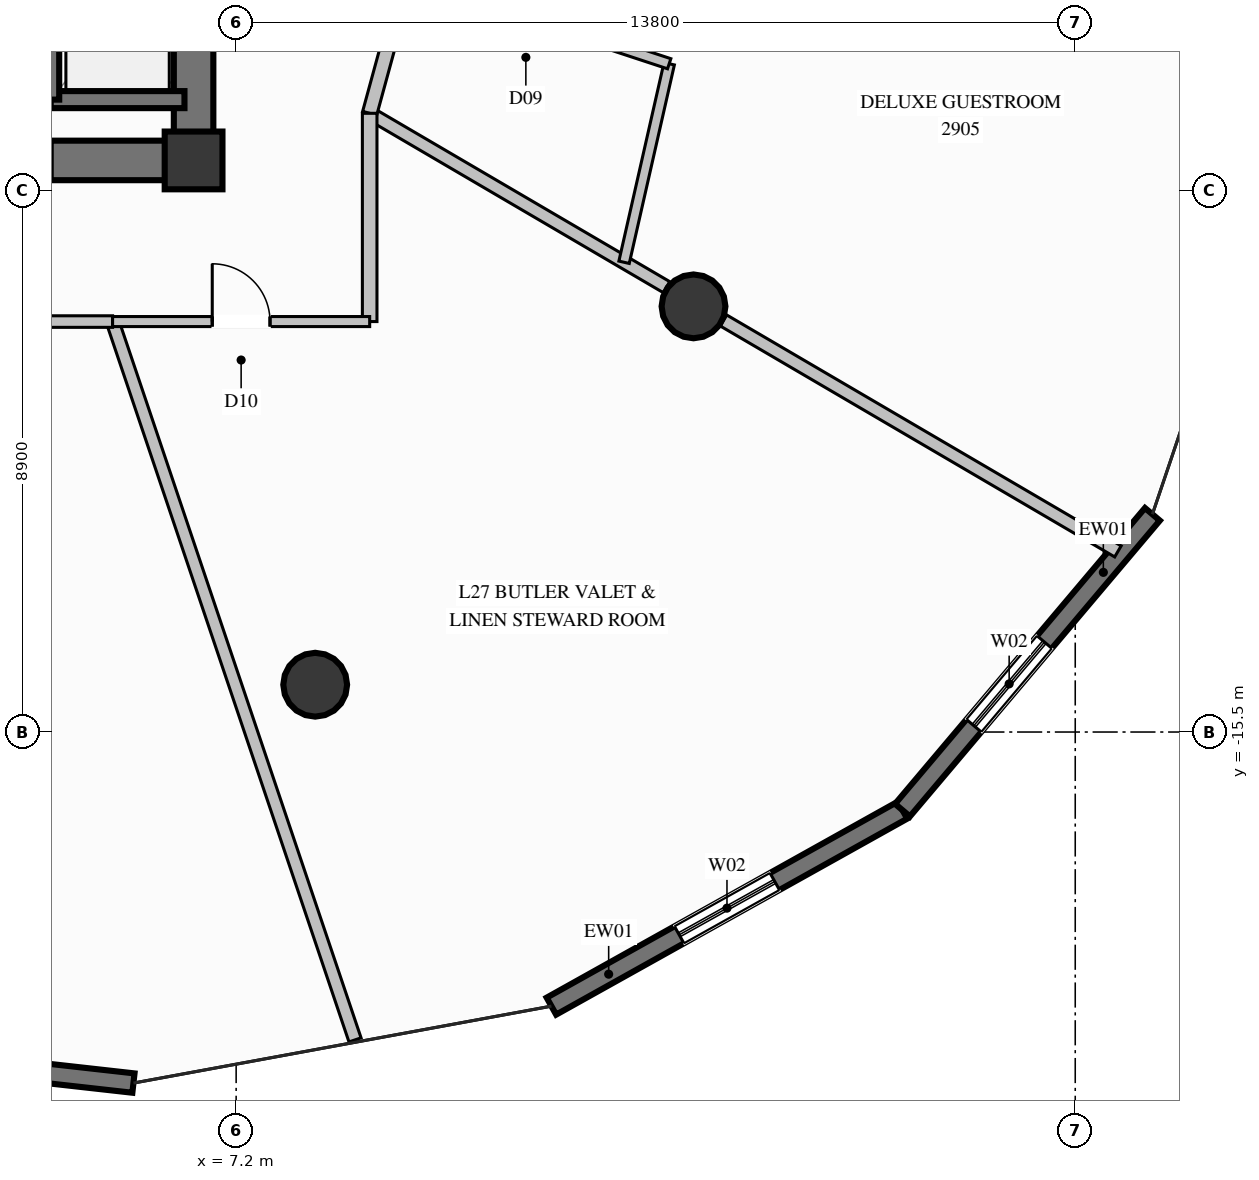
"""IFC4 building model, lengths in metres.
Left out: names, types, materials, properties, quantities, classifications, styles, units other than length and angle.
Written with IfcOpenShell. Run it as: python <this file> out.ifc"""

import sys

from ifc_helpers import new_model, si_unit, direction, frame, frame_2d, origin, origin_2d, place, context, subcontext, project, spatial, rectangle, circle, extrude, element, fill, save


model = new_model("IFC4")
c1 = context("Model", 3, precision=1e-05, world=origin(), true_north=direction((0.0, 1.0)))
c2 = subcontext(c1, "Body", "Model", "MODEL_VIEW")
j1 = project(units=[si_unit("LENGTHUNIT", "METRE"), si_unit("PLANEANGLEUNIT", "RADIAN")], contexts=[c1])
p1 = place(None, origin())
s1 = spatial("IfcSite", under=j1, at=p1, CompositionType="ELEMENT")
p2 = place(p1, origin())
s2 = spatial("IfcBuilding", under=s1, at=p2, CompositionType="ELEMENT")
p3 = place(p2, frame((0.0, 0.0, 109.8)))
s3 = spatial("IfcBuildingStorey", under=s2, at=p3, CompositionType="ELEMENT", Elevation=109.8)
p4 = place(p3, frame((6.5, -6.1, 0.0), z_axis=(0.0, 0.0, 1.0), x_axis=(1.0, 0.0, 0.0)))
e1 = element("IfcColumn", 1, at=p4, inside=s3, PredefinedType="COLUMN", context=c2, shape_type="SweptSolid", body=[
    extrude(rectangle(XDim=0.95, YDim=0.95, at=origin_2d()), origin(), (0.0, 0.0, 1.0), 3.6),
])
p5 = place(p3, frame((4.15, -6.1, 0.0), z_axis=(0.0, 0.0, 1.0), x_axis=(1.0, 0.0, 0.0)))
e2 = element("IfcWall", 2, at=p5, inside=s3, PredefinedType="SHEAR", context=c2, shape_type="SweptSolid", body=[
    extrude(rectangle(XDim=2.025, YDim=0.65, at=frame_2d((1.013, 0.0))), origin(), (0.0, 0.0, 1.0), 3.6),
])
p6 = place(p3, frame((6.5, -6.425, 0.0), z_axis=(0.0, 0.0, 1.0), x_axis=(0.0, 1.0, 0.0)))
e3 = element("IfcWall", 3, at=p6, inside=s3, PredefinedType="SHEAR", context=c2, shape_type="SweptSolid", body=[
    extrude(rectangle(XDim=4.075, YDim=0.65, at=frame_2d((2.038, 0.0))), origin(), (0.0, 0.0, 1.0), 3.6),
])
for number, where, z_axis, x_axis in (
    (4, (8.5, -14.722, 0.0), (0.0, 0.0, 1.0), (1.0, 0.0, 0.0)),
    (5, (14.722, -8.5, 0.0), (0.0, 0.0, 1.0), (1.0, 0.0, 0.0)),
):
    element("IfcColumn", number, at=place(p3, frame(where, z_axis=z_axis, x_axis=x_axis)), inside=s3, PredefinedType="COLUMN", context=c2, shape_type="SweptSolid", body=[
        extrude(circle(Radius=0.525, at=origin_2d()), origin(), (0.0, 0.0, 1.0), 3.6),
    ])
p7 = place(p3, frame((5.511, -21.273, 0.0), z_axis=(0.0, 0.0, 1.0), x_axis=(-0.993784044115, 0.111325081016, 0.0)))
e6 = element("IfcWall", 6, at=p7, inside=s3, PredefinedType="SOLIDWALL", context=c2, shape_type="SweptSolid", body=[
    extrude(rectangle(XDim=7.347, YDim=0.32, at=frame_2d((3.673, 0.0))), origin(), (0.0, 0.0, 1.0), 3.35),
])
p8 = place(p7, frame((2.773, 0.0, 0.35)))
e7 = element("IfcOpeningElement", 7, at=p8, cuts=e6, PredefinedType="OPENING", context=c2, shape_type="SweptSolid", body=[
    extrude(rectangle(XDim=1.8, YDim=2.6, at=frame_2d((0.9, 1.3))), frame((0.0, 0.17, 0.0), z_axis=(0.0, -1.0, 0.0), x_axis=(1.0, 0.0, 0.0)), (0.0, 0.0, 1.0), 0.34),
])
p9 = place(p3, frame((18.159, -16.785, 0.0), z_axis=(0.0, 0.0, 1.0), x_axis=(-0.873166276034, -0.487422459882, 0.0)))
e8 = element("IfcWall", 8, at=p9, inside=s3, PredefinedType="SOLIDWALL", context=c2, shape_type="SweptSolid", body=[
    extrude(rectangle(XDim=6.613, YDim=0.32, at=frame_2d((3.306, 0.0))), origin(), (0.0, 0.0, 1.0), 3.35),
])
p10 = place(p9, frame((2.406, 0.0, 0.35)))
e9 = element("IfcOpeningElement", 9, at=p10, cuts=e8, PredefinedType="OPENING", context=c2, shape_type="SweptSolid", body=[
    extrude(rectangle(XDim=1.8, YDim=2.6, at=frame_2d((0.9, 1.3))), frame((0.0, 0.17, 0.0), z_axis=(0.0, -1.0, 0.0), x_axis=(1.0, 0.0, 0.0)), (0.0, 0.0, 1.0), 0.34),
])
p11 = place(p3, frame((22.269, -11.919, 0.0), z_axis=(0.0, 0.0, 1.0), x_axis=(-0.645278763483, -0.763947195425, 0.0)))
e10 = element("IfcWall", 10, at=p11, inside=s3, PredefinedType="SOLIDWALL", context=c2, shape_type="SweptSolid", body=[
    extrude(rectangle(XDim=6.369, YDim=0.32, at=frame_2d((3.185, 0.0))), origin(), (0.0, 0.0, 1.0), 3.35),
])
p12 = place(p11, frame((2.751, 0.0, 0.35)))
e11 = element("IfcOpeningElement", 11, at=p12, cuts=e10, PredefinedType="OPENING", context=c2, shape_type="SweptSolid", body=[
    extrude(rectangle(XDim=1.8, YDim=2.6, at=frame_2d((0.9, 1.3))), frame((0.0, 0.17, 0.0), z_axis=(0.0, -1.0, 0.0), x_axis=(1.0, 0.0, 0.0)), (0.0, 0.0, 1.0), 0.34),
])
p13 = place(p3, frame((4.15, -5.1, 0.0), z_axis=(0.0, 0.0, 1.0), x_axis=(1.0, 0.0, 0.0)))
e12 = element("IfcWall", 12, at=p13, inside=s3, PredefinedType="SOLIDWALL", context=c2, shape_type="SweptSolid", body=[
    extrude(rectangle(XDim=2.2, YDim=0.28, at=frame_2d((1.1, 0.0))), origin(), (0.0, 0.0, 1.0), 3.35),
])
p14 = place(p3, frame((4.15, -2.4, 0.0), z_axis=(0.0, 0.0, 1.0), x_axis=(0.0, -1.0, 0.0)))
e13 = element("IfcWall", 13, at=p14, inside=s3, PredefinedType="SOLIDWALL", context=c2, shape_type="SweptSolid", body=[
    extrude(rectangle(XDim=2.7, YDim=0.28, at=frame_2d((1.35, 0.0))), origin(), (0.0, 0.0, 1.0), 3.35),
])
p15 = place(p3, frame((9.396, -5.325, 0.0), z_axis=(0.0, 0.0, 1.0), x_axis=(0.862912125579, -0.505353998232, 0.0)))
e14 = element("IfcWall", 14, at=p15, inside=s3, PredefinedType="PARTITIONING", context=c2, shape_type="SweptSolid", body=[
    extrude(rectangle(XDim=5.658, YDim=0.21, at=frame_2d((2.829, 0.0))), origin(), (0.0, 0.0, 1.0), 2.791),
])
p16 = place(p3, frame((15.215, -8.732, 0.0), z_axis=(0.0, 0.0, 1.0), x_axis=(0.862960241997, -0.505271828556, 0.0)))
e15 = element("IfcWall", 15, at=p16, inside=s3, PredefinedType="PARTITIONING", context=c2, shape_type="SweptSolid", body=[
    extrude(rectangle(XDim=7.517, YDim=0.21, at=frame_2d((3.758, 0.0))), origin(), (0.0, 0.0, 1.0), 3.35),
])
p17 = place(p3, frame((9.396, -5.325, 0.0), z_axis=(0.0, 0.0, 1.0), x_axis=(0.263643210908, 0.964620265878, 0.0)))
e16 = element("IfcWall", 16, at=p17, inside=s3, PredefinedType="PARTITIONING", context=c2, shape_type="SweptSolid", body=[
    extrude(rectangle(XDim=2.318, YDim=0.24, at=frame_2d((1.159, 0.0))), origin(), (0.0, 0.0, 1.0), 3.35),
])
p18 = place(p3, frame((13.58, -7.775, 0.0), z_axis=(0.0, 0.0, 1.0), x_axis=(0.221599041774, 0.975137869578, 0.0)))
e17 = element("IfcWall", 17, at=p18, inside=s3, PredefinedType="PLUMBINGWALL", context=c2, shape_type="SweptSolid", body=[
    extrude(rectangle(XDim=3.348, YDim=0.175, at=frame_2d((1.674, 0.0))), origin(), (0.0, 0.0, 1.0), 3.35),
])
p19 = place(p3, frame((10.007, -3.089, 0.0), z_axis=(0.0, 0.0, 1.0), x_axis=(0.949827092004, -0.312775471057, 0.0)))
e18 = element("IfcWall", 18, at=p19, inside=s3, PredefinedType="PLUMBINGWALL", context=c2, shape_type="SweptSolid", body=[
    extrude(rectangle(XDim=4.543, YDim=0.175, at=frame_2d((2.271, 0.0))), origin(), (0.0, 0.0, 1.0), 3.35),
])
p20 = place(p19, frame((1.821, 0.0, 0.0)))
e19 = element("IfcOpeningElement", 19, at=p20, cuts=e18, PredefinedType="OPENING", context=c2, shape_type="SweptSolid", body=[
    extrude(rectangle(XDim=0.9, YDim=2.1, at=frame_2d((0.45, 1.05))), frame((0.0, 0.098, 0.0), z_axis=(0.0, -1.0, 0.0), x_axis=(1.0, 0.0, 0.0)), (0.0, 0.0, 1.0), 0.195),
])
p21 = place(p3, frame((5.168, -8.75, 0.0), z_axis=(0.0, 0.0, 1.0), x_axis=(0.319791389232, -0.947487977429, 0.0)))
e20 = element("IfcWall", 20, at=p21, inside=s3, PredefinedType="PARTITIONING", context=c2, shape_type="SweptSolid", body=[
    extrude(rectangle(XDim=12.468, YDim=0.21, at=frame_2d((6.234, 0.0))), origin(), (0.0, 0.0, 1.0), 3.35),
])
p22 = place(p3, frame((0.0, -8.75, 0.0), z_axis=(0.0, 0.0, 1.0), x_axis=(1.0, 0.0, 0.0)))
e21 = element("IfcWall", 21, at=p22, inside=s3, PredefinedType="PARTITIONING", context=c2, shape_type="SweptSolid", body=[
    extrude(rectangle(XDim=5.168, YDim=0.19, at=frame_2d((2.584, 0.0))), origin(), (0.0, 0.0, 1.0), 3.35),
])
p23 = place(p22, frame((2.109, 0.0, 0.0)))
e22 = element("IfcOpeningElement", 22, at=p23, cuts=e21, PredefinedType="OPENING", context=c2, shape_type="SweptSolid", body=[
    extrude(rectangle(XDim=0.95, YDim=2.1, at=frame_2d((0.475, 1.05))), frame((0.0, 0.105, 0.0), z_axis=(0.0, -1.0, 0.0), x_axis=(1.0, 0.0, 0.0)), (0.0, 0.0, 1.0), 0.21),
])
p24 = place(p3, frame((9.396, -8.75, 0.0), z_axis=(0.0, 0.0, 1.0), x_axis=(0.0, 1.0, 0.0)))
e23 = element("IfcWall", 23, at=p24, inside=s3, PredefinedType="PARTITIONING", context=c2, shape_type="SweptSolid", body=[
    extrude(rectangle(XDim=3.425, YDim=0.24, at=frame_2d((1.712, 0.0))), origin(), (0.0, 0.0, 1.0), 3.35),
])
p25 = place(p3, frame((5.168, -8.75, 0.0), z_axis=(0.0, 0.0, 1.0), x_axis=(1.0, 0.0, 0.0)))
e24 = element("IfcWall", 24, at=p25, inside=s3, PredefinedType="PARTITIONING", context=c2, shape_type="SweptSolid", body=[
    extrude(rectangle(XDim=4.228, YDim=0.165, at=frame_2d((2.114, 0.0))), origin(), (0.0, 0.0, 1.0), 3.35),
])
p26 = place(p25, frame((1.639, 0.0, 0.0)))
e25 = element("IfcOpeningElement", 25, at=p26, cuts=e24, PredefinedType="OPENING", context=c2, shape_type="SweptSolid", body=[
    extrude(rectangle(XDim=0.95, YDim=2.1, at=frame_2d((0.475, 1.05))), frame((0.0, 0.093, 0.0), z_axis=(0.0, -1.0, 0.0), x_axis=(1.0, 0.0, 0.0)), (0.0, 0.0, 1.0), 0.185),
])
p27 = place(p10, origin())
e26 = element("IfcWindow", 26, at=p27, inside=s3, PartitioningType="SINGLE_PANEL", PredefinedType="WINDOW", context=c2, shape_type="SweptSolid", body=[
    extrude(rectangle(XDim=1.8, YDim=2.6, at=frame_2d((0.9, 1.3))), frame((0.0, 0.03, 0.0), z_axis=(0.0, -1.0, 0.0), x_axis=(1.0, 0.0, 0.0)), (0.0, 0.0, 1.0), 0.06),
])
fill(e9, e26)
p28 = place(p12, origin())
e27 = element("IfcWindow", 27, at=p28, inside=s3, PartitioningType="SINGLE_PANEL", PredefinedType="WINDOW", context=c2, shape_type="SweptSolid", body=[
    extrude(rectangle(XDim=1.8, YDim=2.6, at=frame_2d((0.9, 1.3))), frame((0.0, 0.03, 0.0), z_axis=(0.0, -1.0, 0.0), x_axis=(1.0, 0.0, 0.0)), (0.0, 0.0, 1.0), 0.06),
])
fill(e11, e27)
p29 = place(p26, origin())
e28 = element("IfcDoor", 28, at=p29, inside=s3, OperationType="SINGLE_SWING_LEFT", PredefinedType="DOOR", context=c2, shape_type="SweptSolid", body=[
    extrude(rectangle(XDim=0.95, YDim=2.1, at=frame_2d((0.475, 1.05))), frame((0.0, 0.025, 0.0), z_axis=(0.0, -1.0, 0.0), x_axis=(1.0, 0.0, 0.0)), (0.0, 0.0, 1.0), 0.05),
])
fill(e25, e28)
save(model, sys.argv[1])
